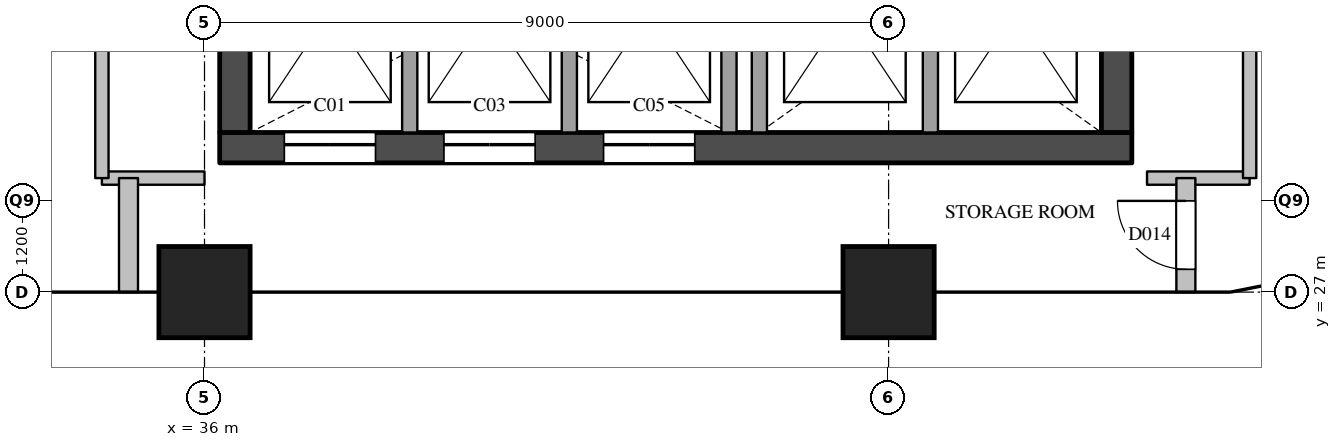
"""IFC4 building model, lengths in metres.
Left out: names, types, materials, properties, quantities, classifications, styles, units other than length and angle.
Written with IfcOpenShell. Run it as: python <this file> out.ifc"""

import sys

from ifc_helpers import new_model, si_unit, direction, frame, frame_2d, origin, origin_2d, place, context, subcontext, project, spatial, rectangle, extrude, element, fill, save


model = new_model("IFC4")
c1 = context("Model", 3, precision=1e-05, world=origin(), true_north=direction((0.0, 1.0)))
c2 = subcontext(c1, "Body", "Model", "MODEL_VIEW")
j1 = project(units=[si_unit("LENGTHUNIT", "METRE"), si_unit("PLANEANGLEUNIT", "RADIAN")], contexts=[c1])
p1 = place(None, origin())
s1 = spatial("IfcSite", under=j1, at=p1, CompositionType="ELEMENT")
p2 = place(p1, origin())
s2 = spatial("IfcBuilding", under=s1, at=p2, CompositionType="ELEMENT")
p3 = place(p2, frame((0.0, 0.0, 265.7)))
s3 = spatial("IfcBuildingStorey", under=s2, at=p3, CompositionType="ELEMENT", Elevation=265.7)
for number, where, z_axis, x_axis in (
    (1, (36.0, 27.0, 0.0), (0.0, 0.0, 1.0), (1.0, 0.0, 0.0)),
    (2, (45.0, 27.0, 0.0), (0.0, 0.0, 1.0), (1.0, 0.0, 0.0)),
):
    element("IfcColumn", number, at=place(p3, frame(where, z_axis=z_axis, x_axis=x_axis)), inside=s3, PredefinedType="COLUMN", context=c2, shape_type="SweptSolid", body=[
        extrude(rectangle(XDim=1.2, YDim=1.2, at=origin_2d()), origin(), (0.0, 0.0, 1.0), 3.9),
    ])
p4 = place(p3, frame((36.2, 28.9, 0.0), z_axis=(0.0, 0.0, 1.0), x_axis=(1.0, 0.0, 0.0)))
e3 = element("IfcWall", 3, at=p4, inside=s3, PredefinedType="SHEAR", context=c2, shape_type="SweptSolid", body=[
    extrude(rectangle(XDim=12.0, YDim=0.4, at=frame_2d((6.0, 0.0))), origin(), (0.0, 0.0, 1.0), 3.6),
])
p5 = place(p4, frame((0.85, 0.0, 0.0)))
e4 = element("IfcOpeningElement", 4, at=p5, cuts=e3, PredefinedType="OPENING", context=c2, shape_type="SweptSolid", body=[
    extrude(rectangle(XDim=1.2, YDim=2.1, at=frame_2d((0.6, 1.05))), frame((0.0, 0.21, 0.0), z_axis=(0.0, -1.0, 0.0), x_axis=(1.0, 0.0, 0.0)), (0.0, 0.0, 1.0), 0.42),
])
p6 = place(p4, frame((2.95, 0.0, 0.0)))
e5 = element("IfcOpeningElement", 5, at=p6, cuts=e3, PredefinedType="OPENING", context=c2, shape_type="SweptSolid", body=[
    extrude(rectangle(XDim=1.2, YDim=2.1, at=frame_2d((0.6, 1.05))), frame((0.0, 0.21, 0.0), z_axis=(0.0, -1.0, 0.0), x_axis=(1.0, 0.0, 0.0)), (0.0, 0.0, 1.0), 0.42),
])
p7 = place(p4, frame((5.05, 0.0, 0.0)))
e6 = element("IfcOpeningElement", 6, at=p7, cuts=e3, PredefinedType="OPENING", context=c2, shape_type="SweptSolid", body=[
    extrude(rectangle(XDim=1.2, YDim=2.1, at=frame_2d((0.6, 1.05))), frame((0.0, 0.21, 0.0), z_axis=(0.0, -1.0, 0.0), x_axis=(1.0, 0.0, 0.0)), (0.0, 0.0, 1.0), 0.42),
])
p8 = place(p3, frame((36.4, 29.1, 0.0), z_axis=(0.0, 0.0, 1.0), x_axis=(0.0, 1.0, 0.0)))
e7 = element("IfcWall", 7, at=p8, inside=s3, PredefinedType="SHEAR", context=c2, shape_type="SweptSolid", body=[
    extrude(rectangle(XDim=20.3, YDim=0.4, at=frame_2d((10.15, 0.0))), origin(), (0.0, 0.0, 1.0), 3.6),
])
p9 = place(p8, frame((3.6, 0.0, 0.0)))
e8 = element("IfcOpeningElement", 8, at=p9, cuts=e7, PredefinedType="OPENING", context=c2, shape_type="SweptSolid", body=[
    extrude(rectangle(XDim=1.8, YDim=2.1, at=frame_2d((0.9, 1.05))), frame((0.0, 0.21, 0.0), z_axis=(0.0, -1.0, 0.0), x_axis=(1.0, 0.0, 0.0)), (0.0, 0.0, 1.0), 0.42),
])
p10 = place(p8, frame((16.4, 0.0, 0.0)))
e9 = element("IfcOpeningElement", 9, at=p10, cuts=e7, PredefinedType="OPENING", context=c2, shape_type="SweptSolid", body=[
    extrude(rectangle(XDim=1.0, YDim=2.1, at=frame_2d((0.5, 1.05))), frame((0.0, 0.21, 0.0), z_axis=(0.0, -1.0, 0.0), x_axis=(1.0, 0.0, 0.0)), (0.0, 0.0, 1.0), 0.42),
])
p11 = place(p3, frame((48.0, 29.1, 0.0), z_axis=(0.0, 0.0, 1.0), x_axis=(0.0, 1.0, 0.0)))
e10 = element("IfcWall", 10, at=p11, inside=s3, PredefinedType="SHEAR", context=c2, shape_type="SweptSolid", body=[
    extrude(rectangle(XDim=20.3, YDim=0.4, at=frame_2d((10.15, 0.0))), origin(), (0.0, 0.0, 1.0), 3.6),
])
p12 = place(p11, frame((12.5, 0.0, 0.0)))
e11 = element("IfcOpeningElement", 11, at=p12, cuts=e10, PredefinedType="OPENING", context=c2, shape_type="SweptSolid", body=[
    extrude(rectangle(XDim=0.7, YDim=2.1, at=frame_2d((0.35, 1.05))), frame((0.0, 0.21, 0.0), z_axis=(0.0, -1.0, 0.0), x_axis=(1.0, 0.0, 0.0)), (0.0, 0.0, 1.0), 0.42),
])
p13 = place(p11, frame((3.9, 0.0, 0.0)))
e12 = element("IfcOpeningElement", 12, at=p13, cuts=e10, PredefinedType="OPENING", context=c2, shape_type="SweptSolid", body=[
    extrude(rectangle(XDim=1.8, YDim=2.1, at=frame_2d((0.9, 1.05))), frame((0.0, 0.21, 0.0), z_axis=(0.0, -1.0, 0.0), x_axis=(1.0, 0.0, 0.0)), (0.0, 0.0, 1.0), 0.42),
])
for number, where, z_axis, x_axis in (
    (13, (38.7, 29.1, 0.0), (0.0, 0.0, 1.0), (0.0, 1.0, 0.0)),
    (14, (40.8, 29.1, 0.0), (0.0, 0.0, 1.0), (0.0, 1.0, 0.0)),
    (15, (42.9, 29.1, 0.0), (0.0, 0.0, 1.0), (0.0, 1.0, 0.0)),
):
    element("IfcWall", number, at=place(p3, frame(where, z_axis=z_axis, x_axis=x_axis)), inside=s3, PredefinedType="SOLIDWALL", context=c2, shape_type="SweptSolid", body=[
        extrude(rectangle(XDim=3.2, YDim=0.2, at=frame_2d((1.6, 0.0))), origin(), (0.0, 0.0, 1.0), 3.6),
    ])
p14 = place(p3, frame((43.3, 29.1, 0.0), z_axis=(0.0, 0.0, 1.0), x_axis=(0.0, 1.0, 0.0)))
e16 = element("IfcWall", 16, at=p14, inside=s3, PredefinedType="SOLIDWALL", context=c2, shape_type="SweptSolid", body=[
    extrude(rectangle(XDim=9.9, YDim=0.2, at=frame_2d((4.95, 0.0))), origin(), (0.0, 0.0, 1.0), 3.6),
])
p15 = place(p3, frame((45.55, 29.1, 0.0), z_axis=(0.0, 0.0, 1.0), x_axis=(0.0, 1.0, 0.0)))
e17 = element("IfcWall", 17, at=p15, inside=s3, PredefinedType="SOLIDWALL", context=c2, shape_type="SweptSolid", body=[
    extrude(rectangle(XDim=3.2, YDim=0.2, at=frame_2d((1.6, 0.0))), origin(), (0.0, 0.0, 1.0), 3.6),
])
for number, where, z_axis, x_axis in (
    (18, (34.65, 28.5, 0.0), (0.0, 0.0, 1.0), (1.0, 0.0, 0.0)),
    (19, (48.4, 28.5, 0.0), (0.0, 0.0, 1.0), (1.0, 0.0, 0.0)),
):
    element("IfcWall", number, at=place(p3, frame(where, z_axis=z_axis, x_axis=x_axis)), inside=s3, PredefinedType="PARTITIONING", context=c2, shape_type="SweptSolid", body=[
        extrude(rectangle(XDim=1.35, YDim=0.175, at=frame_2d((0.675, 0.0))), origin(), (0.0, 0.0, 1.0), 3.6),
    ])
p16 = place(p3, frame((34.65, 28.5, 0.0), z_axis=(0.0, 0.0, 1.0), x_axis=(0.0, 1.0, 0.0)))
e20 = element("IfcWall", 20, at=p16, inside=s3, PredefinedType="PARTITIONING", context=c2, shape_type="SweptSolid", body=[
    extrude(rectangle(XDim=22.85, YDim=0.175, at=frame_2d((11.425, 0.0))), origin(), (0.0, 0.0, 1.0), 3.6),
])
p17 = place(p16, frame((5.3, 0.0, 0.0)))
e21 = element("IfcOpeningElement", 21, at=p17, cuts=e20, PredefinedType="OPENING", context=c2, shape_type="SweptSolid", body=[
    extrude(rectangle(XDim=0.9, YDim=2.1, at=frame_2d((0.45, 1.05))), frame((0.0, 0.097, 0.0), z_axis=(0.0, -1.0, 0.0), x_axis=(1.0, 0.0, 0.0)), (0.0, 0.0, 1.0), 0.195),
])
p18 = place(p16, frame((13.5, 0.0, 0.0)))
e22 = element("IfcOpeningElement", 22, at=p18, cuts=e20, PredefinedType="OPENING", context=c2, shape_type="SweptSolid", body=[
    extrude(rectangle(XDim=1.0, YDim=2.1, at=frame_2d((0.5, 1.05))), frame((0.0, 0.097, 0.0), z_axis=(0.0, -1.0, 0.0), x_axis=(1.0, 0.0, 0.0)), (0.0, 0.0, 1.0), 0.195),
])
p19 = place(p16, frame((16.9, 0.0, 0.0)))
e23 = element("IfcOpeningElement", 23, at=p19, cuts=e20, PredefinedType="OPENING", context=c2, shape_type="SweptSolid", body=[
    extrude(rectangle(XDim=1.0, YDim=2.1, at=frame_2d((0.5, 1.05))), frame((0.0, 0.097, 0.0), z_axis=(0.0, -1.0, 0.0), x_axis=(1.0, 0.0, 0.0)), (0.0, 0.0, 1.0), 0.195),
])
p20 = place(p3, frame((49.75, 28.5, 0.0), z_axis=(0.0, 0.0, 1.0), x_axis=(0.0, 1.0, 0.0)))
e24 = element("IfcWall", 24, at=p20, inside=s3, PredefinedType="PARTITIONING", context=c2, shape_type="SweptSolid", body=[
    extrude(rectangle(XDim=22.85, YDim=0.175, at=frame_2d((11.425, 0.0))), origin(), (0.0, 0.0, 1.0), 3.6),
])
p21 = place(p20, frame((5.3, 0.0, 0.0)))
e25 = element("IfcOpeningElement", 25, at=p21, cuts=e24, PredefinedType="OPENING", context=c2, shape_type="SweptSolid", body=[
    extrude(rectangle(XDim=0.9, YDim=2.1, at=frame_2d((0.45, 1.05))), frame((0.0, 0.097, 0.0), z_axis=(0.0, -1.0, 0.0), x_axis=(1.0, 0.0, 0.0)), (0.0, 0.0, 1.0), 0.195),
])
p22 = place(p20, frame((16.725, 0.0, 0.0)))
e26 = element("IfcOpeningElement", 26, at=p22, cuts=e24, PredefinedType="OPENING", context=c2, shape_type="SweptSolid", body=[
    extrude(rectangle(XDim=0.9, YDim=2.1, at=frame_2d((0.45, 1.05))), frame((0.0, 0.097, 0.0), z_axis=(0.0, -1.0, 0.0), x_axis=(1.0, 0.0, 0.0)), (0.0, 0.0, 1.0), 0.195),
])
p23 = place(p3, frame((35.0, 27.0, 0.0), z_axis=(0.0, 0.0, 1.0), x_axis=(0.0, 1.0, 0.0)))
e27 = element("IfcWall", 27, at=p23, inside=s3, PredefinedType="PARTITIONING", context=c2, shape_type="SweptSolid", body=[
    extrude(rectangle(XDim=1.5, YDim=0.25, at=frame_2d((0.75, 0.0))), origin(), (0.0, 0.0, 1.0), 2.6),
])
p24 = place(p3, frame((48.911, 27.0, 0.0), z_axis=(0.0, 0.0, 1.0), x_axis=(0.0, 1.0, 0.0)))
e28 = element("IfcWall", 28, at=p24, inside=s3, PredefinedType="PARTITIONING", context=c2, shape_type="SweptSolid", body=[
    extrude(rectangle(XDim=1.5, YDim=0.25, at=frame_2d((0.75, 0.0))), origin(), (0.0, 0.0, 1.0), 2.6),
])
p25 = place(p24, frame((0.3, 0.0, 0.0)))
e29 = element("IfcOpeningElement", 29, at=p25, cuts=e28, PredefinedType="OPENING", context=c2, shape_type="SweptSolid", body=[
    extrude(rectangle(XDim=0.9, YDim=2.1, at=frame_2d((0.45, 1.05))), frame((0.0, 0.135, 0.0), z_axis=(0.0, -1.0, 0.0), x_axis=(1.0, 0.0, 0.0)), (0.0, 0.0, 1.0), 0.27),
])
p26 = place(p5, origin())
e30 = element("IfcDoor", 30, at=p26, inside=s3, OperationType="SLIDING_TO_LEFT", PredefinedType="DOOR", context=c2, shape_type="SweptSolid", body=[
    extrude(rectangle(XDim=1.2, YDim=2.1, at=frame_2d((0.6, 1.05))), frame((0.0, 0.025, 0.0), z_axis=(0.0, -1.0, 0.0), x_axis=(1.0, 0.0, 0.0)), (0.0, 0.0, 1.0), 0.05),
])
fill(e4, e30)
p27 = place(p6, origin())
e31 = element("IfcDoor", 31, at=p27, inside=s3, OperationType="SLIDING_TO_LEFT", PredefinedType="DOOR", context=c2, shape_type="SweptSolid", body=[
    extrude(rectangle(XDim=1.2, YDim=2.1, at=frame_2d((0.6, 1.05))), frame((0.0, 0.025, 0.0), z_axis=(0.0, -1.0, 0.0), x_axis=(1.0, 0.0, 0.0)), (0.0, 0.0, 1.0), 0.05),
])
fill(e5, e31)
p28 = place(p7, origin())
e32 = element("IfcDoor", 32, at=p28, inside=s3, OperationType="SLIDING_TO_LEFT", PredefinedType="DOOR", context=c2, shape_type="SweptSolid", body=[
    extrude(rectangle(XDim=1.2, YDim=2.1, at=frame_2d((0.6, 1.05))), frame((0.0, 0.025, 0.0), z_axis=(0.0, -1.0, 0.0), x_axis=(1.0, 0.0, 0.0)), (0.0, 0.0, 1.0), 0.05),
])
fill(e6, e32)
p29 = place(p25, origin())
e33 = element("IfcDoor", 33, at=p29, inside=s3, OperationType="SINGLE_SWING_RIGHT", PredefinedType="DOOR", context=c2, shape_type="SweptSolid", body=[
    extrude(rectangle(XDim=0.9, YDim=2.1, at=frame_2d((0.45, 1.05))), frame((0.0, 0.025, 0.0), z_axis=(0.0, -1.0, 0.0), x_axis=(1.0, 0.0, 0.0)), (0.0, 0.0, 1.0), 0.05),
])
fill(e29, e33)
save(model, sys.argv[1])
